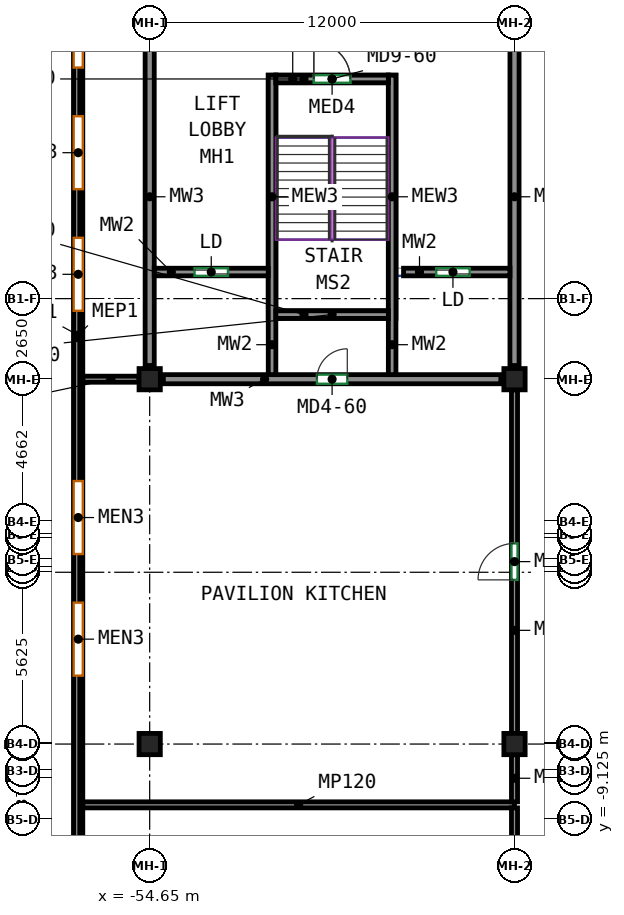
"""IFC4 building model, lengths in metres.
Left out: names, types, materials, properties, quantities, classifications, styles, units other than length and angle.
Written with IfcOpenShell. Run it as: python <this file> out.ifc"""

import sys

from ifc_helpers import new_model, si_unit, direction, frame, frame_2d, origin, origin_2d, place, context, subcontext, project, spatial, rectangle, extrude, source, transform, mapped, element, fill, save


model = new_model("IFC4")
c1 = context("Model", 3, precision=1e-05, world=origin(), true_north=direction((0.0, 1.0)))
c2 = subcontext(c1, "Body", "Model", "MODEL_VIEW")
j1 = project(units=[si_unit("LENGTHUNIT", "METRE"), si_unit("PLANEANGLEUNIT", "RADIAN")], contexts=[c1])
p1 = place(None, origin())
s1 = spatial("IfcSite", under=j1, at=p1, CompositionType="ELEMENT")
p2 = place(p1, origin())
s2 = spatial("IfcBuilding", under=s1, at=p2, CompositionType="ELEMENT")
p3 = place(p2, frame((0.0, 0.0, 22.5)))
s3 = spatial("IfcBuildingStorey", under=s2, at=p3, CompositionType="ELEMENT", Elevation=22.5)
m1 = source(origin(), c2, "Body", "SweptSolid", [
    extrude(rectangle(XDim=0.7, YDim=0.7, at=origin_2d()), origin(), (0.0, 0.0, 1.0), 4.22),
])
for number, where, z_axis, x_axis in (
    (1, (-54.65, -6.65, 0.0), (0.0, 0.0, 1.0), (1.0, 0.0, 0.0)),
    (2, (-54.65, 5.35, 0.0), (0.0, 0.0, 1.0), (1.0, 0.0, 0.0)),
    (3, (-42.65, -6.65, 0.0), (0.0, 0.0, 1.0), (1.0, 0.0, 0.0)),
    (4, (-42.65, 5.35, 0.0), (0.0, 0.0, 1.0), (1.0, 0.0, 0.0)),
):
    element("IfcColumn", number, at=place(p3, frame(where, z_axis=z_axis, x_axis=x_axis)), inside=s3, PredefinedType="COLUMN", context=c2, shape_type="MappedRepresentation", body=[
        mapped(m1, transform((0.0, 0.0, 0.0))),
    ])
m2 = source(origin(), c2, "Body", "SweptSolid", [
    extrude(rectangle(XDim=11.1, YDim=0.3, at=frame_2d((5.55, 0.0))), origin(), (0.0, 0.0, 1.0), 3.42),
])
p4 = place(p3, frame((-54.2, 5.35, 0.0), z_axis=(0.0, 0.0, 1.0), x_axis=(1.0, 0.0, 0.0)))
e5 = element("IfcWall", 5, at=p4, inside=s3, PredefinedType="SHEAR", context=c2, shape_type="MappedRepresentation", body=[
    mapped(m2, transform((0.0, 0.0, 0.0))),
])
p5 = place(p4, frame((5.05, 0.0, 0.0)))
e6 = element("IfcOpeningElement", 6, at=p5, cuts=e5, PredefinedType="OPENING", context=c2, shape_type="SweptSolid", body=[
    extrude(rectangle(XDim=1.0, YDim=2.1, at=frame_2d((0.5, 1.05))), frame((0.0, 0.16, 0.0), z_axis=(0.0, -1.0, 0.0), x_axis=(1.0, 0.0, 0.0)), (0.0, 0.0, 1.0), 0.32),
])
for number, where, z_axis, x_axis in (
    (7, (-54.65, 5.8, 0.0), (0.0, 0.0, 1.0), (0.0, 1.0, 0.0)),
    (8, (-42.65, 5.8, 0.0), (0.0, 0.0, 1.0), (0.0, 1.0, 0.0)),
):
    element("IfcWall", number, at=place(p3, frame(where, z_axis=z_axis, x_axis=x_axis)), inside=s3, PredefinedType="SHEAR", context=c2, shape_type="MappedRepresentation", body=[
        mapped(m2, transform((0.0, 0.0, 0.0))),
    ])
m3 = source(origin(), c2, "Body", "SweptSolid", [
    extrude(rectangle(XDim=9.85, YDim=0.25, at=frame_2d((4.925, 0.0))), origin(), (0.0, 0.0, 1.0), 4.22),
])
for number, where, z_axis, x_axis in (
    (9, (-50.625, 5.5, 0.0), (0.0, 0.0, 1.0), (0.0, 1.0, 0.0)),
    (10, (-46.675, 5.5, 0.0), (0.0, 0.0, 1.0), (0.0, 1.0, 0.0)),
):
    element("IfcWall", number, at=place(p3, frame(where, z_axis=z_axis, x_axis=x_axis)), inside=s3, PredefinedType="SHEAR", context=c2, shape_type="MappedRepresentation", body=[
        mapped(m3, transform((0.0, 0.0, 0.0))),
    ])
m4 = source(origin(), c2, "Body", "SweptSolid", [
    extrude(rectangle(XDim=3.7, YDim=0.25, at=frame_2d((1.85, 0.0))), origin(), (0.0, 0.0, 1.0), 4.22),
])
p6 = place(p3, frame((-50.5, 7.475, 0.0), z_axis=(0.0, 0.0, 1.0), x_axis=(1.0, 0.0, 0.0)))
e11 = element("IfcWall", 11, at=p6, inside=s3, PredefinedType="SHEAR", context=c2, shape_type="MappedRepresentation", body=[
    mapped(m4, transform((0.0, 0.0, 0.0))),
])
p7 = place(p3, frame((-50.5, 15.225, 0.0), z_axis=(0.0, 0.0, 1.0), x_axis=(1.0, 0.0, 0.0)))
e12 = element("IfcWall", 12, at=p7, inside=s3, PredefinedType="SHEAR", context=c2, shape_type="MappedRepresentation", body=[
    mapped(m4, transform((0.0, 0.0, 0.0))),
])
p8 = place(p7, frame((1.25, 0.0, 0.0)))
e13 = element("IfcOpeningElement", 13, at=p8, cuts=e12, PredefinedType="OPENING", context=c2, shape_type="SweptSolid", body=[
    extrude(rectangle(XDim=1.2, YDim=2.1, at=frame_2d((0.6, 1.05))), frame((0.0, 0.135, 0.0), z_axis=(0.0, -1.0, 0.0), x_axis=(1.0, 0.0, 0.0)), (0.0, 0.0, 1.0), 0.27),
])
m5 = source(origin(), c2, "Body", "SweptSolid", [
    extrude(rectangle(XDim=3.75, YDim=0.25, at=frame_2d((1.875, 0.0))), origin(), (0.0, 0.0, 1.0), 4.22),
])
p9 = place(p3, frame((-54.5, 8.875, 0.0), z_axis=(0.0, 0.0, 1.0), x_axis=(1.0, 0.0, 0.0)))
e14 = element("IfcWall", 14, at=p9, inside=s3, PredefinedType="SHEAR", context=c2, shape_type="MappedRepresentation", body=[
    mapped(m5, transform((0.0, 0.0, 0.0))),
])
p10 = place(p9, frame((1.325, 0.0, 0.0)))
e15 = element("IfcOpeningElement", 15, at=p10, cuts=e14, PredefinedType="OPENING", context=c2, shape_type="SweptSolid", body=[
    extrude(rectangle(XDim=1.1, YDim=2.1, at=frame_2d((0.55, 1.05))), frame((0.0, 0.135, 0.0), z_axis=(0.0, -1.0, 0.0), x_axis=(1.0, 0.0, 0.0)), (0.0, 0.0, 1.0), 0.27),
])
m6 = source(origin(), c2, "Body", "SweptSolid", [
    extrude(rectangle(XDim=3.5, YDim=0.25, at=frame_2d((1.75, 0.0))), origin(), (0.0, 0.0, 1.0), 4.22),
])
p11 = place(p3, frame((-46.3, 8.875, 0.0), z_axis=(0.0, 0.0, 1.0), x_axis=(1.0, 0.0, 0.0)))
e16 = element("IfcWall", 16, at=p11, inside=s3, PredefinedType="SHEAR", context=c2, shape_type="MappedRepresentation", body=[
    mapped(m6, transform((0.0, 0.0, 0.0))),
])
p12 = place(p11, frame((1.075, 0.0, 0.0)))
e17 = element("IfcOpeningElement", 17, at=p12, cuts=e16, PredefinedType="OPENING", context=c2, shape_type="SweptSolid", body=[
    extrude(rectangle(XDim=1.1, YDim=2.1, at=frame_2d((0.55, 1.05))), frame((0.0, 0.135, 0.0), z_axis=(0.0, -1.0, 0.0), x_axis=(1.0, 0.0, 0.0)), (0.0, 0.0, 1.0), 0.27),
])
m7 = source(origin(), c2, "Body", "SweptSolid", [
    extrude(rectangle(XDim=100.7, YDim=0.3, at=frame_2d((50.35, 0.0))), origin(), (0.0, 0.0, 1.0), 4.22),
])
p13 = place(p3, frame((-57.0, -43.55, 0.0), z_axis=(0.0, 0.0, 1.0), x_axis=(0.0, 1.0, 0.0)))
e18 = element("IfcWall", 18, at=p13, inside=s3, PredefinedType="SOLIDWALL", context=c2, shape_type="MappedRepresentation", body=[
    mapped(m7, transform((0.0, 0.0, 0.0))),
])
p14 = place(p13, frame((3.15, 0.0, 0.9)))
e19 = element("IfcOpeningElement", 19, at=p14, cuts=e18, PredefinedType="OPENING", context=c2, shape_type="SweptSolid", body=[
    extrude(rectangle(XDim=2.4, YDim=1.8, at=frame_2d((1.2, 0.9))), frame((0.0, 0.16, 0.0), z_axis=(0.0, -1.0, 0.0), x_axis=(1.0, 0.0, 0.0)), (0.0, 0.0, 1.0), 0.32),
])
p15 = place(p13, frame((7.15, 0.0, 0.9)))
e20 = element("IfcOpeningElement", 20, at=p15, cuts=e18, PredefinedType="OPENING", context=c2, shape_type="SweptSolid", body=[
    extrude(rectangle(XDim=2.4, YDim=1.8, at=frame_2d((1.2, 0.9))), frame((0.0, 0.16, 0.0), z_axis=(0.0, -1.0, 0.0), x_axis=(1.0, 0.0, 0.0)), (0.0, 0.0, 1.0), 0.32),
])
p16 = place(p13, frame((11.15, 0.0, 0.9)))
e21 = element("IfcOpeningElement", 21, at=p16, cuts=e18, PredefinedType="OPENING", context=c2, shape_type="SweptSolid", body=[
    extrude(rectangle(XDim=2.4, YDim=1.8, at=frame_2d((1.2, 0.9))), frame((0.0, 0.16, 0.0), z_axis=(0.0, -1.0, 0.0), x_axis=(1.0, 0.0, 0.0)), (0.0, 0.0, 1.0), 0.32),
])
p17 = place(p13, frame((19.15, 0.0, 0.9)))
e22 = element("IfcOpeningElement", 22, at=p17, cuts=e18, PredefinedType="OPENING", context=c2, shape_type="SweptSolid", body=[
    extrude(rectangle(XDim=2.4, YDim=1.8, at=frame_2d((1.2, 0.9))), frame((0.0, 0.16, 0.0), z_axis=(0.0, -1.0, 0.0), x_axis=(1.0, 0.0, 0.0)), (0.0, 0.0, 1.0), 0.32),
])
p18 = place(p13, frame((23.15, 0.0, 0.9)))
e23 = element("IfcOpeningElement", 23, at=p18, cuts=e18, PredefinedType="OPENING", context=c2, shape_type="SweptSolid", body=[
    extrude(rectangle(XDim=2.4, YDim=1.8, at=frame_2d((1.2, 0.9))), frame((0.0, 0.16, 0.0), z_axis=(0.0, -1.0, 0.0), x_axis=(1.0, 0.0, 0.0)), (0.0, 0.0, 1.0), 0.32),
])
p19 = place(p13, frame((27.15, 0.0, 0.9)))
e24 = element("IfcOpeningElement", 24, at=p19, cuts=e18, PredefinedType="OPENING", context=c2, shape_type="SweptSolid", body=[
    extrude(rectangle(XDim=2.4, YDim=1.8, at=frame_2d((1.2, 0.9))), frame((0.0, 0.16, 0.0), z_axis=(0.0, -1.0, 0.0), x_axis=(1.0, 0.0, 0.0)), (0.0, 0.0, 1.0), 0.32),
])
p20 = place(p13, frame((31.15, 0.0, 0.9)))
e25 = element("IfcOpeningElement", 25, at=p20, cuts=e18, PredefinedType="OPENING", context=c2, shape_type="SweptSolid", body=[
    extrude(rectangle(XDim=2.4, YDim=1.8, at=frame_2d((1.2, 0.9))), frame((0.0, 0.16, 0.0), z_axis=(0.0, -1.0, 0.0), x_axis=(1.0, 0.0, 0.0)), (0.0, 0.0, 1.0), 0.32),
])
p21 = place(p13, frame((39.15, 0.0, 0.9)))
e26 = element("IfcOpeningElement", 26, at=p21, cuts=e18, PredefinedType="OPENING", context=c2, shape_type="SweptSolid", body=[
    extrude(rectangle(XDim=2.4, YDim=1.8, at=frame_2d((1.2, 0.9))), frame((0.0, 0.16, 0.0), z_axis=(0.0, -1.0, 0.0), x_axis=(1.0, 0.0, 0.0)), (0.0, 0.0, 1.0), 0.32),
])
p22 = place(p13, frame((43.15, 0.0, 0.9)))
e27 = element("IfcOpeningElement", 27, at=p22, cuts=e18, PredefinedType="OPENING", context=c2, shape_type="SweptSolid", body=[
    extrude(rectangle(XDim=2.4, YDim=1.8, at=frame_2d((1.2, 0.9))), frame((0.0, 0.16, 0.0), z_axis=(0.0, -1.0, 0.0), x_axis=(1.0, 0.0, 0.0)), (0.0, 0.0, 1.0), 0.32),
])
p23 = place(p13, frame((51.15, 0.0, 0.9)))
e28 = element("IfcOpeningElement", 28, at=p23, cuts=e18, PredefinedType="OPENING", context=c2, shape_type="SweptSolid", body=[
    extrude(rectangle(XDim=2.4, YDim=1.8, at=frame_2d((1.2, 0.9))), frame((0.0, 0.16, 0.0), z_axis=(0.0, -1.0, 0.0), x_axis=(1.0, 0.0, 0.0)), (0.0, 0.0, 1.0), 0.32),
])
p24 = place(p13, frame((55.15, 0.0, 0.9)))
e29 = element("IfcOpeningElement", 29, at=p24, cuts=e18, PredefinedType="OPENING", context=c2, shape_type="SweptSolid", body=[
    extrude(rectangle(XDim=2.4, YDim=1.8, at=frame_2d((1.2, 0.9))), frame((0.0, 0.16, 0.0), z_axis=(0.0, -1.0, 0.0), x_axis=(1.0, 0.0, 0.0)), (0.0, 0.0, 1.0), 0.32),
])
p25 = place(p13, frame((59.15, 0.0, 0.9)))
e30 = element("IfcOpeningElement", 30, at=p25, cuts=e18, PredefinedType="OPENING", context=c2, shape_type="SweptSolid", body=[
    extrude(rectangle(XDim=2.4, YDim=1.8, at=frame_2d((1.2, 0.9))), frame((0.0, 0.16, 0.0), z_axis=(0.0, -1.0, 0.0), x_axis=(1.0, 0.0, 0.0)), (0.0, 0.0, 1.0), 0.32),
])
p26 = place(p13, frame((63.15, 0.0, 0.9)))
e31 = element("IfcOpeningElement", 31, at=p26, cuts=e18, PredefinedType="OPENING", context=c2, shape_type="SweptSolid", body=[
    extrude(rectangle(XDim=2.4, YDim=1.8, at=frame_2d((1.2, 0.9))), frame((0.0, 0.16, 0.0), z_axis=(0.0, -1.0, 0.0), x_axis=(1.0, 0.0, 0.0)), (0.0, 0.0, 1.0), 0.32),
])
p27 = place(p13, frame((67.15, 0.0, 0.9)))
e32 = element("IfcOpeningElement", 32, at=p27, cuts=e18, PredefinedType="OPENING", context=c2, shape_type="SweptSolid", body=[
    extrude(rectangle(XDim=2.4, YDim=1.8, at=frame_2d((1.2, 0.9))), frame((0.0, 0.16, 0.0), z_axis=(0.0, -1.0, 0.0), x_axis=(1.0, 0.0, 0.0)), (0.0, 0.0, 1.0), 0.32),
])
p28 = place(p13, frame((75.15, 0.0, 0.9)))
e33 = element("IfcOpeningElement", 33, at=p28, cuts=e18, PredefinedType="OPENING", context=c2, shape_type="SweptSolid", body=[
    extrude(rectangle(XDim=2.4, YDim=1.8, at=frame_2d((1.2, 0.9))), frame((0.0, 0.16, 0.0), z_axis=(0.0, -1.0, 0.0), x_axis=(1.0, 0.0, 0.0)), (0.0, 0.0, 1.0), 0.32),
])
p29 = place(p13, frame((79.15, 0.0, 0.9)))
e34 = element("IfcOpeningElement", 34, at=p29, cuts=e18, PredefinedType="OPENING", context=c2, shape_type="SweptSolid", body=[
    extrude(rectangle(XDim=2.4, YDim=1.8, at=frame_2d((1.2, 0.9))), frame((0.0, 0.16, 0.0), z_axis=(0.0, -1.0, 0.0), x_axis=(1.0, 0.0, 0.0)), (0.0, 0.0, 1.0), 0.32),
])
p30 = place(p13, frame((83.15, 0.0, 0.9)))
e35 = element("IfcOpeningElement", 35, at=p30, cuts=e18, PredefinedType="OPENING", context=c2, shape_type="SweptSolid", body=[
    extrude(rectangle(XDim=2.4, YDim=1.8, at=frame_2d((1.2, 0.9))), frame((0.0, 0.16, 0.0), z_axis=(0.0, -1.0, 0.0), x_axis=(1.0, 0.0, 0.0)), (0.0, 0.0, 1.0), 0.32),
])
p31 = place(p13, frame((87.15, 0.0, 0.9)))
e36 = element("IfcOpeningElement", 36, at=p31, cuts=e18, PredefinedType="OPENING", context=c2, shape_type="SweptSolid", body=[
    extrude(rectangle(XDim=2.4, YDim=1.8, at=frame_2d((1.2, 0.9))), frame((0.0, 0.16, 0.0), z_axis=(0.0, -1.0, 0.0), x_axis=(1.0, 0.0, 0.0)), (0.0, 0.0, 1.0), 0.32),
])
p32 = place(p13, frame((91.15, 0.0, 0.9)))
e37 = element("IfcOpeningElement", 37, at=p32, cuts=e18, PredefinedType="OPENING", context=c2, shape_type="SweptSolid", body=[
    extrude(rectangle(XDim=2.4, YDim=1.8, at=frame_2d((1.2, 0.9))), frame((0.0, 0.16, 0.0), z_axis=(0.0, -1.0, 0.0), x_axis=(1.0, 0.0, 0.0)), (0.0, 0.0, 1.0), 0.32),
])
p33 = place(p13, frame((95.15, 0.0, 0.9)))
e38 = element("IfcOpeningElement", 38, at=p33, cuts=e18, PredefinedType="OPENING", context=c2, shape_type="SweptSolid", body=[
    extrude(rectangle(XDim=2.4, YDim=1.8, at=frame_2d((1.2, 0.9))), frame((0.0, 0.16, 0.0), z_axis=(0.0, -1.0, 0.0), x_axis=(1.0, 0.0, 0.0)), (0.0, 0.0, 1.0), 0.32),
])
m8 = source(origin(), c2, "Body", "SweptSolid", [
    extrude(rectangle(XDim=100.8, YDim=0.2, at=frame_2d((50.4, 0.0))), origin(), (0.0, 0.0, 1.0), 1.1),
])
p34 = place(p3, frame((-57.05, -43.65, 4.5), z_axis=(0.0, 0.0, 1.0), x_axis=(0.0, 1.0, 0.0)))
e39 = element("IfcWall", 39, at=p34, inside=s3, PredefinedType="PARAPET", context=c2, shape_type="MappedRepresentation", body=[
    mapped(m8, transform((0.0, 0.0, 0.0))),
])
m9 = source(origin(), c2, "Body", "SweptSolid", [
    extrude(rectangle(XDim=8.0, YDim=0.25, at=frame_2d((4.0, 0.0))), origin(), (0.0, 0.0, 1.0), 3.0),
])
for number, where, z_axis, x_axis in (
    (40, (-50.625, 7.35, 4.5), (0.0, 0.0, 1.0), (0.0, 1.0, 0.0)),
    (41, (-46.675, 7.35, 4.5), (0.0, 0.0, 1.0), (0.0, 1.0, 0.0)),
):
    element("IfcWall", number, at=place(p3, frame(where, z_axis=z_axis, x_axis=x_axis)), inside=s3, PredefinedType="SOLIDWALL", context=c2, shape_type="MappedRepresentation", body=[
        mapped(m9, transform((0.0, 0.0, 0.0))),
    ])
m10 = source(origin(), c2, "Body", "SweptSolid", [
    extrude(rectangle(XDim=3.7, YDim=0.25, at=frame_2d((1.85, 0.0))), origin(), (0.0, 0.0, 1.0), 3.0),
])
p35 = place(p3, frame((-50.5, 7.475, 4.5), z_axis=(0.0, 0.0, 1.0), x_axis=(1.0, 0.0, 0.0)))
e42 = element("IfcWall", 42, at=p35, inside=s3, PredefinedType="SOLIDWALL", context=c2, shape_type="MappedRepresentation", body=[
    mapped(m10, transform((0.0, 0.0, 0.0))),
])
p36 = place(p3, frame((-50.5, 15.225, 4.5), z_axis=(0.0, 0.0, 1.0), x_axis=(1.0, 0.0, 0.0)))
e43 = element("IfcWall", 43, at=p36, inside=s3, PredefinedType="SOLIDWALL", context=c2, shape_type="MappedRepresentation", body=[
    mapped(m10, transform((0.0, 0.0, 0.0))),
])
p37 = place(p36, frame((1.25, 0.0, 0.0)))
e44 = element("IfcOpeningElement", 44, at=p37, cuts=e43, PredefinedType="OPENING", context=c2, shape_type="SweptSolid", body=[
    extrude(rectangle(XDim=1.2, YDim=2.1, at=frame_2d((0.6, 1.05))), frame((0.0, 0.135, 0.0), z_axis=(0.0, -1.0, 0.0), x_axis=(1.0, 0.0, 0.0)), (0.0, 0.0, 1.0), 0.27),
])
m11 = source(origin(), c2, "Body", "SweptSolid", [
    extrude(rectangle(XDim=14.2, YDim=0.2, at=frame_2d((7.1, 0.0))), origin(), (0.0, 0.0, 1.0), 3.42),
])
p38 = place(p3, frame((-56.85, -8.65, 0.0), z_axis=(0.0, 0.0, 1.0), x_axis=(1.0, 0.0, 0.0)))
e45 = element("IfcWall", 45, at=p38, inside=s3, PredefinedType="PARTITIONING", context=c2, shape_type="MappedRepresentation", body=[
    mapped(m11, transform((0.0, 0.0, 0.0))),
])
m12 = source(origin(), c2, "Body", "SweptSolid", [
    extrude(rectangle(XDim=1.85, YDim=0.2, at=frame_2d((0.925, 0.0))), origin(), (0.0, 0.0, 1.0), 4.22),
])
p39 = place(p3, frame((-56.85, 5.35, 0.0), z_axis=(0.0, 0.0, 1.0), x_axis=(1.0, 0.0, 0.0)))
e46 = element("IfcWall", 46, at=p39, inside=s3, PredefinedType="PARTITIONING", context=c2, shape_type="MappedRepresentation", body=[
    mapped(m12, transform((0.0, 0.0, 0.0))),
])
m13 = source(origin(), c2, "Body", "SweptSolid", [
    extrude(rectangle(XDim=9.55, YDim=0.2, at=frame_2d((4.775, 0.0))), origin(), (0.0, 0.0, 1.0), 3.42),
])
p40 = place(p3, frame((-42.65, -18.3, 0.0), z_axis=(0.0, 0.0, 1.0), x_axis=(0.0, 1.0, 0.0)))
e47 = element("IfcWall", 47, at=p40, inside=s3, PredefinedType="PARTITIONING", context=c2, shape_type="MappedRepresentation", body=[
    mapped(m13, transform((0.0, 0.0, 0.0))),
])
m14 = source(origin(), c2, "Body", "SweptSolid", [
    extrude(rectangle(XDim=1.55, YDim=0.2, at=frame_2d((0.775, 0.0))), origin(), (0.0, 0.0, 1.0), 3.42),
])
p41 = place(p3, frame((-42.65, -8.55, 0.0), z_axis=(0.0, 0.0, 1.0), x_axis=(0.0, 1.0, 0.0)))
e48 = element("IfcWall", 48, at=p41, inside=s3, PredefinedType="PARTITIONING", context=c2, shape_type="MappedRepresentation", body=[
    mapped(m14, transform((0.0, 0.0, 0.0))),
])
m15 = source(origin(), c2, "Body", "SweptSolid", [
    extrude(rectangle(XDim=11.3, YDim=0.2, at=frame_2d((5.65, 0.0))), origin(), (0.0, 0.0, 1.0), 3.42),
])
p42 = place(p3, frame((-42.65, -6.3, 0.0), z_axis=(0.0, 0.0, 1.0), x_axis=(0.0, 1.0, 0.0)))
e49 = element("IfcWall", 49, at=p42, inside=s3, PredefinedType="PARTITIONING", context=c2, shape_type="MappedRepresentation", body=[
    mapped(m15, transform((0.0, 0.0, 0.0))),
])
p43 = place(p42, frame((5.05, 0.0, 0.0)))
e50 = element("IfcOpeningElement", 50, at=p43, cuts=e49, PredefinedType="OPENING", context=c2, shape_type="SweptSolid", body=[
    extrude(rectangle(XDim=1.2, YDim=2.1, at=frame_2d((0.6, 1.05))), frame((0.0, 0.11, 0.0), z_axis=(0.0, -1.0, 0.0), x_axis=(1.0, 0.0, 0.0)), (0.0, 0.0, 1.0), 0.22),
])
p44 = place(p21, origin())
e51 = element("IfcWindow", 51, at=p44, inside=s3, PartitioningType="SINGLE_PANEL", PredefinedType="WINDOW", context=c2, shape_type="SweptSolid", body=[
    extrude(rectangle(XDim=2.4, YDim=1.8, at=frame_2d((1.2, 0.9))), frame((0.0, 0.03, 0.0), z_axis=(0.0, -1.0, 0.0), x_axis=(1.0, 0.0, 0.0)), (0.0, 0.0, 1.0), 0.06),
])
fill(e26, e51)
p45 = place(p22, origin())
e52 = element("IfcWindow", 52, at=p45, inside=s3, PartitioningType="SINGLE_PANEL", PredefinedType="WINDOW", context=c2, shape_type="SweptSolid", body=[
    extrude(rectangle(XDim=2.4, YDim=1.8, at=frame_2d((1.2, 0.9))), frame((0.0, 0.03, 0.0), z_axis=(0.0, -1.0, 0.0), x_axis=(1.0, 0.0, 0.0)), (0.0, 0.0, 1.0), 0.06),
])
fill(e27, e52)
p46 = place(p23, origin())
e53 = element("IfcWindow", 53, at=p46, inside=s3, PartitioningType="SINGLE_PANEL", PredefinedType="WINDOW", context=c2, shape_type="SweptSolid", body=[
    extrude(rectangle(XDim=2.4, YDim=1.8, at=frame_2d((1.2, 0.9))), frame((0.0, 0.03, 0.0), z_axis=(0.0, -1.0, 0.0), x_axis=(1.0, 0.0, 0.0)), (0.0, 0.0, 1.0), 0.06),
])
fill(e28, e53)
p47 = place(p24, origin())
e54 = element("IfcWindow", 54, at=p47, inside=s3, PartitioningType="SINGLE_PANEL", PredefinedType="WINDOW", context=c2, shape_type="SweptSolid", body=[
    extrude(rectangle(XDim=2.4, YDim=1.8, at=frame_2d((1.2, 0.9))), frame((0.0, 0.03, 0.0), z_axis=(0.0, -1.0, 0.0), x_axis=(1.0, 0.0, 0.0)), (0.0, 0.0, 1.0), 0.06),
])
fill(e29, e54)
p48 = place(p25, origin())
e55 = element("IfcWindow", 55, at=p48, inside=s3, PartitioningType="SINGLE_PANEL", PredefinedType="WINDOW", context=c2, shape_type="SweptSolid", body=[
    extrude(rectangle(XDim=2.4, YDim=1.8, at=frame_2d((1.2, 0.9))), frame((0.0, 0.03, 0.0), z_axis=(0.0, -1.0, 0.0), x_axis=(1.0, 0.0, 0.0)), (0.0, 0.0, 1.0), 0.06),
])
fill(e30, e55)
p49 = place(p37, origin())
e56 = element("IfcDoor", 56, at=p49, inside=s3, OperationType="DOUBLE_DOOR_SINGLE_SWING", PredefinedType="DOOR", context=c2, shape_type="SweptSolid", body=[
    extrude(rectangle(XDim=1.2, YDim=2.1, at=frame_2d((0.6, 1.05))), frame((0.0, 0.025, 0.0), z_axis=(0.0, -1.0, 0.0), x_axis=(1.0, 0.0, 0.0)), (0.0, 0.0, 1.0), 0.05),
])
fill(e44, e56)
p50 = place(p8, origin())
e57 = element("IfcDoor", 57, at=p50, inside=s3, OperationType="DOUBLE_DOOR_SINGLE_SWING", PredefinedType="DOOR", context=c2, shape_type="SweptSolid", body=[
    extrude(rectangle(XDim=1.2, YDim=2.1, at=frame_2d((0.6, 1.05))), frame((0.0, 0.025, 0.0), z_axis=(0.0, -1.0, 0.0), x_axis=(1.0, 0.0, 0.0)), (0.0, 0.0, 1.0), 0.05),
])
fill(e13, e57)
p51 = place(p10, origin())
e58 = element("IfcDoor", 58, at=p51, inside=s3, OperationType="SLIDING_TO_LEFT", PredefinedType="DOOR", context=c2, shape_type="SweptSolid", body=[
    extrude(rectangle(XDim=1.1, YDim=2.1, at=frame_2d((0.55, 1.05))), frame((0.0, 0.025, 0.0), z_axis=(0.0, -1.0, 0.0), x_axis=(1.0, 0.0, 0.0)), (0.0, 0.0, 1.0), 0.05),
])
fill(e15, e58)
p52 = place(p12, origin())
e59 = element("IfcDoor", 59, at=p52, inside=s3, OperationType="SLIDING_TO_LEFT", PredefinedType="DOOR", context=c2, shape_type="SweptSolid", body=[
    extrude(rectangle(XDim=1.1, YDim=2.1, at=frame_2d((0.55, 1.05))), frame((0.0, 0.025, 0.0), z_axis=(0.0, -1.0, 0.0), x_axis=(1.0, 0.0, 0.0)), (0.0, 0.0, 1.0), 0.05),
])
fill(e17, e59)
p53 = place(p5, origin())
e60 = element("IfcDoor", 60, at=p53, inside=s3, OperationType="SINGLE_SWING_RIGHT", PredefinedType="DOOR", context=c2, shape_type="SweptSolid", body=[
    extrude(rectangle(XDim=1.0, YDim=2.1, at=frame_2d((0.5, 1.05))), frame((0.0, 0.025, 0.0), z_axis=(0.0, -1.0, 0.0), x_axis=(1.0, 0.0, 0.0)), (0.0, 0.0, 1.0), 0.05),
])
fill(e6, e60)
p54 = place(p43, origin())
e61 = element("IfcDoor", 61, at=p54, inside=s3, OperationType="SINGLE_SWING_LEFT", PredefinedType="DOOR", context=c2, shape_type="SweptSolid", body=[
    extrude(rectangle(XDim=1.2, YDim=2.1, at=frame_2d((0.6, 1.05))), frame((0.0, 0.025, 0.0), z_axis=(0.0, -1.0, 0.0), x_axis=(1.0, 0.0, 0.0)), (0.0, 0.0, 1.0), 0.05),
])
fill(e50, e61)
save(model, sys.argv[1])
